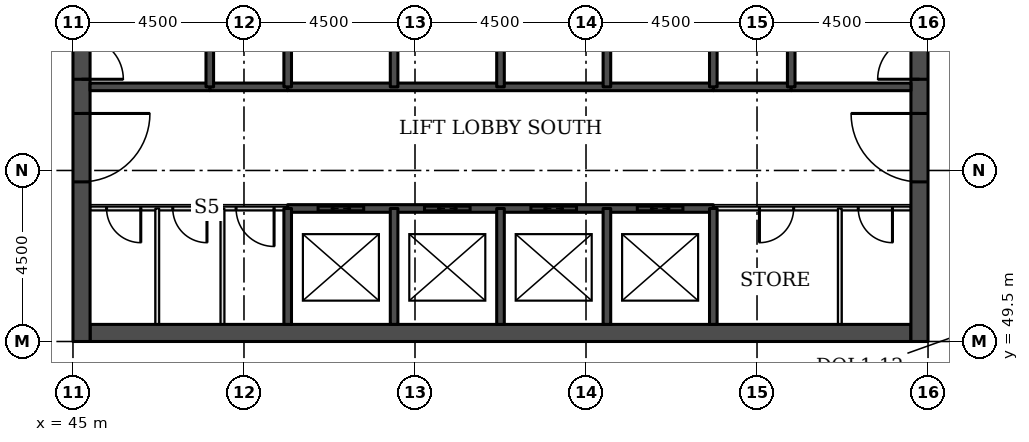
"""IFC4 building model, lengths in metres.
Left out: names, types, materials, properties, quantities, classifications, styles, units other than length and angle.
Written with IfcOpenShell. Run it as: python <this file> out.ifc"""

import sys

from ifc_helpers import new_model, si_unit, direction, frame, frame_2d, origin, place, context, subcontext, project, spatial, rectangle, extrude, element, fill, save


model = new_model("IFC4")
c1 = context("Model", 3, precision=1e-05, world=origin(), true_north=direction((0.0, 1.0)))
c2 = subcontext(c1, "Body", "Model", "MODEL_VIEW")
j1 = project(units=[si_unit("LENGTHUNIT", "METRE"), si_unit("PLANEANGLEUNIT", "RADIAN")], contexts=[c1])
p1 = place(None, origin())
s1 = spatial("IfcSite", under=j1, at=p1, CompositionType="ELEMENT")
p2 = place(p1, origin())
s2 = spatial("IfcBuilding", under=s1, at=p2, CompositionType="ELEMENT")
p3 = place(p2, frame((0.0, 0.0, 78.9)))
s3 = spatial("IfcBuildingStorey", under=s2, at=p3, CompositionType="ELEMENT", Elevation=78.9)
p4 = place(p3, frame((45.45, 49.725, 0.0), z_axis=(0.0, 0.0, 1.0), x_axis=(1.0, 0.0, 0.0)))
e1 = element("IfcWall", 1, at=p4, inside=s3, PredefinedType="SHEAR", context=c2, shape_type="SweptSolid", body=[
    extrude(rectangle(XDim=21.6, YDim=0.45, at=frame_2d((10.8, 0.0))), origin(), (0.0, 0.0, 1.0), 3.7),
])
p5 = place(p3, frame((45.225, 49.5, 0.0), z_axis=(0.0, 0.0, 1.0), x_axis=(0.0, 1.0, 0.0)))
e2 = element("IfcWall", 2, at=p5, inside=s3, PredefinedType="SHEAR", context=c2, shape_type="SweptSolid", body=[
    extrude(rectangle(XDim=22.5, YDim=0.45, at=frame_2d((11.25, 0.0))), origin(), (0.0, 0.0, 1.0), 3.7),
])
p6 = place(p5, frame((4.2, 0.0, 0.0)))
e3 = element("IfcOpeningElement", 3, at=p6, cuts=e2, PredefinedType="OPENING", context=c2, shape_type="SweptSolid", body=[
    extrude(rectangle(XDim=1.8, YDim=2.1, at=frame_2d((0.9, 1.05))), frame((0.0, 0.235, 0.0), z_axis=(0.0, -1.0, 0.0), x_axis=(1.0, 0.0, 0.0)), (0.0, 0.0, 1.0), 0.47),
])
p7 = place(p5, frame((6.9, 0.0, 0.0)))
e4 = element("IfcOpeningElement", 4, at=p7, cuts=e2, PredefinedType="OPENING", context=c2, shape_type="SweptSolid", body=[
    extrude(rectangle(XDim=1.1, YDim=2.1, at=frame_2d((0.55, 1.05))), frame((0.0, 0.235, 0.0), z_axis=(0.0, -1.0, 0.0), x_axis=(1.0, 0.0, 0.0)), (0.0, 0.0, 1.0), 0.47),
])
p8 = place(p5, frame((13.6, 0.0, 0.0)))
e5 = element("IfcOpeningElement", 5, at=p8, cuts=e2, PredefinedType="OPENING", context=c2, shape_type="SweptSolid", body=[
    extrude(rectangle(XDim=1.1, YDim=2.1, at=frame_2d((0.55, 1.05))), frame((0.0, 0.235, 0.0), z_axis=(0.0, -1.0, 0.0), x_axis=(1.0, 0.0, 0.0)), (0.0, 0.0, 1.0), 0.47),
])
p9 = place(p5, frame((16.5, 0.0, 0.0)))
e6 = element("IfcOpeningElement", 6, at=p9, cuts=e2, PredefinedType="OPENING", context=c2, shape_type="SweptSolid", body=[
    extrude(rectangle(XDim=1.8, YDim=2.1, at=frame_2d((0.9, 1.05))), frame((0.0, 0.235, 0.0), z_axis=(0.0, -1.0, 0.0), x_axis=(1.0, 0.0, 0.0)), (0.0, 0.0, 1.0), 0.47),
])
p10 = place(p3, frame((67.275, 49.5, 0.0), z_axis=(0.0, 0.0, 1.0), x_axis=(0.0, 1.0, 0.0)))
e7 = element("IfcWall", 7, at=p10, inside=s3, PredefinedType="SHEAR", context=c2, shape_type="SweptSolid", body=[
    extrude(rectangle(XDim=22.5, YDim=0.45, at=frame_2d((11.25, 0.0))), origin(), (0.0, 0.0, 1.0), 3.7),
])
p11 = place(p10, frame((4.2, 0.0, 0.0)))
e8 = element("IfcOpeningElement", 8, at=p11, cuts=e7, PredefinedType="OPENING", context=c2, shape_type="SweptSolid", body=[
    extrude(rectangle(XDim=1.8, YDim=2.1, at=frame_2d((0.9, 1.05))), frame((0.0, 0.235, 0.0), z_axis=(0.0, -1.0, 0.0), x_axis=(1.0, 0.0, 0.0)), (0.0, 0.0, 1.0), 0.47),
])
p12 = place(p10, frame((6.9, 0.0, 0.0)))
e9 = element("IfcOpeningElement", 9, at=p12, cuts=e7, PredefinedType="OPENING", context=c2, shape_type="SweptSolid", body=[
    extrude(rectangle(XDim=1.1, YDim=2.1, at=frame_2d((0.55, 1.05))), frame((0.0, 0.235, 0.0), z_axis=(0.0, -1.0, 0.0), x_axis=(1.0, 0.0, 0.0)), (0.0, 0.0, 1.0), 0.47),
])
p13 = place(p10, frame((13.6, 0.0, 0.0)))
e10 = element("IfcOpeningElement", 10, at=p13, cuts=e7, PredefinedType="OPENING", context=c2, shape_type="SweptSolid", body=[
    extrude(rectangle(XDim=1.1, YDim=2.1, at=frame_2d((0.55, 1.05))), frame((0.0, 0.235, 0.0), z_axis=(0.0, -1.0, 0.0), x_axis=(1.0, 0.0, 0.0)), (0.0, 0.0, 1.0), 0.47),
])
p14 = place(p10, frame((16.5, 0.0, 0.0)))
e11 = element("IfcOpeningElement", 11, at=p14, cuts=e7, PredefinedType="OPENING", context=c2, shape_type="SweptSolid", body=[
    extrude(rectangle(XDim=1.8, YDim=2.1, at=frame_2d((0.9, 1.05))), frame((0.0, 0.235, 0.0), z_axis=(0.0, -1.0, 0.0), x_axis=(1.0, 0.0, 0.0)), (0.0, 0.0, 1.0), 0.47),
])
p15 = place(p3, frame((45.45, 53.0, 0.0), z_axis=(0.0, 0.0, 1.0), x_axis=(1.0, 0.0, 0.0)))
e12 = element("IfcWall", 12, at=p15, inside=s3, PredefinedType="PARTITIONING", context=c2, shape_type="SweptSolid", body=[
    extrude(rectangle(XDim=5.2, YDim=0.1, at=frame_2d((2.6, 0.0))), origin(), (0.0, 0.0, 1.0), 3.55),
])
p16 = place(p15, frame((0.434, 0.0, 0.0)))
e13 = element("IfcOpeningElement", 13, at=p16, cuts=e12, PredefinedType="OPENING", context=c2, shape_type="SweptSolid", body=[
    extrude(rectangle(XDim=0.9, YDim=2.1, at=frame_2d((0.45, 1.05))), frame((0.0, 0.06, 0.0), z_axis=(0.0, -1.0, 0.0), x_axis=(1.0, 0.0, 0.0)), (0.0, 0.0, 1.0), 0.12),
])
p17 = place(p15, frame((2.176, 0.0, 0.0)))
e14 = element("IfcOpeningElement", 14, at=p17, cuts=e12, PredefinedType="OPENING", context=c2, shape_type="SweptSolid", body=[
    extrude(rectangle(XDim=0.9, YDim=2.1, at=frame_2d((0.45, 1.05))), frame((0.0, 0.06, 0.0), z_axis=(0.0, -1.0, 0.0), x_axis=(1.0, 0.0, 0.0)), (0.0, 0.0, 1.0), 0.12),
])
p18 = place(p15, frame((3.842, 0.0, 0.0)))
e15 = element("IfcOpeningElement", 15, at=p18, cuts=e12, PredefinedType="OPENING", context=c2, shape_type="SweptSolid", body=[
    extrude(rectangle(XDim=1.0, YDim=2.1, at=frame_2d((0.5, 1.05))), frame((0.0, 0.06, 0.0), z_axis=(0.0, -1.0, 0.0), x_axis=(1.0, 0.0, 0.0)), (0.0, 0.0, 1.0), 0.12),
])
p19 = place(p3, frame((61.85, 53.0, 0.0), z_axis=(0.0, 0.0, 1.0), x_axis=(1.0, 0.0, 0.0)))
e16 = element("IfcWall", 16, at=p19, inside=s3, PredefinedType="PARTITIONING", context=c2, shape_type="SweptSolid", body=[
    extrude(rectangle(XDim=5.2, YDim=0.1, at=frame_2d((2.6, 0.0))), origin(), (0.0, 0.0, 1.0), 3.55),
])
p20 = place(p19, frame((3.814, 0.0, 0.0)))
e17 = element("IfcOpeningElement", 17, at=p20, cuts=e16, PredefinedType="OPENING", context=c2, shape_type="SweptSolid", body=[
    extrude(rectangle(XDim=0.9, YDim=2.1, at=frame_2d((0.45, 1.05))), frame((0.0, 0.06, 0.0), z_axis=(0.0, -1.0, 0.0), x_axis=(1.0, 0.0, 0.0)), (0.0, 0.0, 1.0), 0.12),
])
p21 = place(p19, frame((1.214, 0.0, 0.0)))
e18 = element("IfcOpeningElement", 18, at=p21, cuts=e16, PredefinedType="OPENING", context=c2, shape_type="SweptSolid", body=[
    extrude(rectangle(XDim=0.9, YDim=2.1, at=frame_2d((0.45, 1.05))), frame((0.0, 0.06, 0.0), z_axis=(0.0, -1.0, 0.0), x_axis=(1.0, 0.0, 0.0)), (0.0, 0.0, 1.0), 0.12),
])
p22 = place(p3, frame((50.65, 53.0, 0.0), z_axis=(0.0, 0.0, 1.0), x_axis=(1.0, 0.0, 0.0)))
e19 = element("IfcWall", 19, at=p22, inside=s3, PredefinedType="SOLIDWALL", context=c2, shape_type="SweptSolid", body=[
    extrude(rectangle(XDim=11.2, YDim=0.2, at=frame_2d((5.6, 0.0))), origin(), (0.0, 0.0, 1.0), 3.55),
])
p23 = place(p22, frame((0.8, 0.0, 0.0)))
e20 = element("IfcOpeningElement", 20, at=p23, cuts=e19, PredefinedType="OPENING", context=c2, shape_type="SweptSolid", body=[
    extrude(rectangle(XDim=1.2, YDim=2.1, at=frame_2d((0.6, 1.05))), frame((0.0, 0.11, 0.0), z_axis=(0.0, -1.0, 0.0), x_axis=(1.0, 0.0, 0.0)), (0.0, 0.0, 1.0), 0.22),
])
p24 = place(p22, frame((3.6, 0.0, 0.0)))
e21 = element("IfcOpeningElement", 21, at=p24, cuts=e19, PredefinedType="OPENING", context=c2, shape_type="SweptSolid", body=[
    extrude(rectangle(XDim=1.2, YDim=2.1, at=frame_2d((0.6, 1.05))), frame((0.0, 0.11, 0.0), z_axis=(0.0, -1.0, 0.0), x_axis=(1.0, 0.0, 0.0)), (0.0, 0.0, 1.0), 0.22),
])
p25 = place(p22, frame((6.4, 0.0, 0.0)))
e22 = element("IfcOpeningElement", 22, at=p25, cuts=e19, PredefinedType="OPENING", context=c2, shape_type="SweptSolid", body=[
    extrude(rectangle(XDim=1.2, YDim=2.1, at=frame_2d((0.6, 1.05))), frame((0.0, 0.11, 0.0), z_axis=(0.0, -1.0, 0.0), x_axis=(1.0, 0.0, 0.0)), (0.0, 0.0, 1.0), 0.22),
])
p26 = place(p22, frame((9.2, 0.0, 0.0)))
e23 = element("IfcOpeningElement", 23, at=p26, cuts=e19, PredefinedType="OPENING", context=c2, shape_type="SweptSolid", body=[
    extrude(rectangle(XDim=1.2, YDim=2.1, at=frame_2d((0.6, 1.05))), frame((0.0, 0.11, 0.0), z_axis=(0.0, -1.0, 0.0), x_axis=(1.0, 0.0, 0.0)), (0.0, 0.0, 1.0), 0.22),
])
for number, where, z_axis, x_axis in (
    (24, (48.6, 56.2, 0.0), (0.0, 0.0, 1.0), (1.0, 0.0, 0.0)),
    (25, (61.85, 56.2, 0.0), (0.0, 0.0, 1.0), (1.0, 0.0, 0.0)),
):
    element("IfcWall", number, at=place(p3, frame(where, z_axis=z_axis, x_axis=x_axis)), inside=s3, PredefinedType="SOLIDWALL", context=c2, shape_type="SweptSolid", body=[
        extrude(rectangle(XDim=2.05, YDim=0.2, at=frame_2d((1.025, 0.0))), origin(), (0.0, 0.0, 1.0), 3.55),
    ])
p27 = place(p3, frame((45.45, 56.2, 0.0), z_axis=(0.0, 0.0, 1.0), x_axis=(1.0, 0.0, 0.0)))
e26 = element("IfcWall", 26, at=p27, inside=s3, PredefinedType="SOLIDWALL", context=c2, shape_type="SweptSolid", body=[
    extrude(rectangle(XDim=3.15, YDim=0.2, at=frame_2d((1.575, 0.0))), origin(), (0.0, 0.0, 1.0), 3.55),
])
p28 = place(p3, frame((50.65, 56.2, 0.0), z_axis=(0.0, 0.0, 1.0), x_axis=(1.0, 0.0, 0.0)))
e27 = element("IfcWall", 27, at=p28, inside=s3, PredefinedType="SOLIDWALL", context=c2, shape_type="SweptSolid", body=[
    extrude(rectangle(XDim=11.2, YDim=0.2, at=frame_2d((5.6, 0.0))), origin(), (0.0, 0.0, 1.0), 3.55),
])
p29 = place(p3, frame((63.9, 56.2, 0.0), z_axis=(0.0, 0.0, 1.0), x_axis=(1.0, 0.0, 0.0)))
e28 = element("IfcWall", 28, at=p29, inside=s3, PredefinedType="SOLIDWALL", context=c2, shape_type="SweptSolid", body=[
    extrude(rectangle(XDim=3.15, YDim=0.2, at=frame_2d((1.575, 0.0))), origin(), (0.0, 0.0, 1.0), 3.55),
])
p30 = place(p3, frame((47.218, 49.95, 0.0), z_axis=(0.0, 0.0, 1.0), x_axis=(0.0, 1.0, 0.0)))
e29 = element("IfcWall", 29, at=p30, inside=s3, PredefinedType="PARTITIONING", context=c2, shape_type="SweptSolid", body=[
    extrude(rectangle(XDim=3.05, YDim=0.1, at=frame_2d((1.525, 0.0))), origin(), (0.0, 0.0, 1.0), 3.55),
])
p31 = place(p3, frame((48.6, 56.2, 0.0), z_axis=(0.0, 0.0, 1.0), x_axis=(0.0, 1.0, 0.0)))
e30 = element("IfcWall", 30, at=p31, inside=s3, PredefinedType="SOLIDWALL", context=c2, shape_type="SweptSolid", body=[
    extrude(rectangle(XDim=5.8, YDim=0.2, at=frame_2d((2.9, 0.0))), origin(), (0.0, 0.0, 1.0), 3.55),
])
p32 = place(p3, frame((48.934, 49.95, 0.0), z_axis=(0.0, 0.0, 1.0), x_axis=(0.0, 1.0, 0.0)))
e31 = element("IfcWall", 31, at=p32, inside=s3, PredefinedType="PARTITIONING", context=c2, shape_type="SweptSolid", body=[
    extrude(rectangle(XDim=3.05, YDim=0.1, at=frame_2d((1.525, 0.0))), origin(), (0.0, 0.0, 1.0), 3.55),
])
p33 = place(p3, frame((50.65, 49.95, 0.0), z_axis=(0.0, 0.0, 1.0), x_axis=(0.0, 1.0, 0.0)))
e32 = element("IfcWall", 32, at=p33, inside=s3, PredefinedType="SOLIDWALL", context=c2, shape_type="SweptSolid", body=[
    extrude(rectangle(XDim=3.05, YDim=0.2, at=frame_2d((1.525, 0.0))), origin(), (0.0, 0.0, 1.0), 3.55),
])
p34 = place(p3, frame((50.65, 56.2, 0.0), z_axis=(0.0, 0.0, 1.0), x_axis=(0.0, 1.0, 0.0)))
e33 = element("IfcWall", 33, at=p34, inside=s3, PredefinedType="SOLIDWALL", context=c2, shape_type="SweptSolid", body=[
    extrude(rectangle(XDim=2.8, YDim=0.2, at=frame_2d((1.4, 0.0))), origin(), (0.0, 0.0, 1.0), 3.55),
])
p35 = place(p3, frame((53.45, 49.95, 0.0), z_axis=(0.0, 0.0, 1.0), x_axis=(0.0, 1.0, 0.0)))
e34 = element("IfcWall", 34, at=p35, inside=s3, PredefinedType="SOLIDWALL", context=c2, shape_type="SweptSolid", body=[
    extrude(rectangle(XDim=3.05, YDim=0.2, at=frame_2d((1.525, 0.0))), origin(), (0.0, 0.0, 1.0), 3.55),
])
p36 = place(p3, frame((53.45, 56.2, 0.0), z_axis=(0.0, 0.0, 1.0), x_axis=(0.0, 1.0, 0.0)))
e35 = element("IfcWall", 35, at=p36, inside=s3, PredefinedType="SOLIDWALL", context=c2, shape_type="SweptSolid", body=[
    extrude(rectangle(XDim=2.8, YDim=0.2, at=frame_2d((1.4, 0.0))), origin(), (0.0, 0.0, 1.0), 3.55),
])
p37 = place(p3, frame((56.25, 49.95, 0.0), z_axis=(0.0, 0.0, 1.0), x_axis=(0.0, 1.0, 0.0)))
e36 = element("IfcWall", 36, at=p37, inside=s3, PredefinedType="SOLIDWALL", context=c2, shape_type="SweptSolid", body=[
    extrude(rectangle(XDim=3.05, YDim=0.2, at=frame_2d((1.525, 0.0))), origin(), (0.0, 0.0, 1.0), 3.55),
])
p38 = place(p3, frame((56.25, 56.2, 0.0), z_axis=(0.0, 0.0, 1.0), x_axis=(0.0, 1.0, 0.0)))
e37 = element("IfcWall", 37, at=p38, inside=s3, PredefinedType="SOLIDWALL", context=c2, shape_type="SweptSolid", body=[
    extrude(rectangle(XDim=2.8, YDim=0.2, at=frame_2d((1.4, 0.0))), origin(), (0.0, 0.0, 1.0), 3.55),
])
p39 = place(p3, frame((59.05, 49.95, 0.0), z_axis=(0.0, 0.0, 1.0), x_axis=(0.0, 1.0, 0.0)))
e38 = element("IfcWall", 38, at=p39, inside=s3, PredefinedType="SOLIDWALL", context=c2, shape_type="SweptSolid", body=[
    extrude(rectangle(XDim=3.05, YDim=0.2, at=frame_2d((1.525, 0.0))), origin(), (0.0, 0.0, 1.0), 3.55),
])
p40 = place(p3, frame((59.05, 56.2, 0.0), z_axis=(0.0, 0.0, 1.0), x_axis=(0.0, 1.0, 0.0)))
e39 = element("IfcWall", 39, at=p40, inside=s3, PredefinedType="SOLIDWALL", context=c2, shape_type="SweptSolid", body=[
    extrude(rectangle(XDim=2.8, YDim=0.2, at=frame_2d((1.4, 0.0))), origin(), (0.0, 0.0, 1.0), 3.55),
])
p41 = place(p3, frame((61.85, 49.95, 0.0), z_axis=(0.0, 0.0, 1.0), x_axis=(0.0, 1.0, 0.0)))
e40 = element("IfcWall", 40, at=p41, inside=s3, PredefinedType="SOLIDWALL", context=c2, shape_type="SweptSolid", body=[
    extrude(rectangle(XDim=3.05, YDim=0.2, at=frame_2d((1.525, 0.0))), origin(), (0.0, 0.0, 1.0), 3.55),
])
p42 = place(p3, frame((61.85, 56.2, 0.0), z_axis=(0.0, 0.0, 1.0), x_axis=(0.0, 1.0, 0.0)))
e41 = element("IfcWall", 41, at=p42, inside=s3, PredefinedType="SOLIDWALL", context=c2, shape_type="SweptSolid", body=[
    extrude(rectangle(XDim=2.8, YDim=0.2, at=frame_2d((1.4, 0.0))), origin(), (0.0, 0.0, 1.0), 3.55),
])
p43 = place(p3, frame((63.9, 56.2, 0.0), z_axis=(0.0, 0.0, 1.0), x_axis=(0.0, 1.0, 0.0)))
e42 = element("IfcWall", 42, at=p43, inside=s3, PredefinedType="SOLIDWALL", context=c2, shape_type="SweptSolid", body=[
    extrude(rectangle(XDim=5.8, YDim=0.2, at=frame_2d((2.9, 0.0))), origin(), (0.0, 0.0, 1.0), 3.55),
])
p44 = place(p3, frame((65.178, 49.95, 0.0), z_axis=(0.0, 0.0, 1.0), x_axis=(0.0, 1.0, 0.0)))
e43 = element("IfcWall", 43, at=p44, inside=s3, PredefinedType="PARTITIONING", context=c2, shape_type="SweptSolid", body=[
    extrude(rectangle(XDim=3.05, YDim=0.1, at=frame_2d((1.525, 0.0))), origin(), (0.0, 0.0, 1.0), 3.55),
])
p45 = place(p23, origin())
e44 = element("IfcDoor", 44, at=p45, inside=s3, OperationType="DOUBLE_DOOR_SLIDING", PredefinedType="DOOR", context=c2, shape_type="SweptSolid", body=[
    extrude(rectangle(XDim=1.2, YDim=2.1, at=frame_2d((0.6, 1.05))), frame((0.0, 0.025, 0.0), z_axis=(0.0, -1.0, 0.0), x_axis=(1.0, 0.0, 0.0)), (0.0, 0.0, 1.0), 0.05),
])
fill(e20, e44)
p46 = place(p24, origin())
e45 = element("IfcDoor", 45, at=p46, inside=s3, OperationType="DOUBLE_DOOR_SLIDING", PredefinedType="DOOR", context=c2, shape_type="SweptSolid", body=[
    extrude(rectangle(XDim=1.2, YDim=2.1, at=frame_2d((0.6, 1.05))), frame((0.0, 0.025, 0.0), z_axis=(0.0, -1.0, 0.0), x_axis=(1.0, 0.0, 0.0)), (0.0, 0.0, 1.0), 0.05),
])
fill(e21, e45)
p47 = place(p25, origin())
e46 = element("IfcDoor", 46, at=p47, inside=s3, OperationType="DOUBLE_DOOR_SLIDING", PredefinedType="DOOR", context=c2, shape_type="SweptSolid", body=[
    extrude(rectangle(XDim=1.2, YDim=2.1, at=frame_2d((0.6, 1.05))), frame((0.0, 0.025, 0.0), z_axis=(0.0, -1.0, 0.0), x_axis=(1.0, 0.0, 0.0)), (0.0, 0.0, 1.0), 0.05),
])
fill(e22, e46)
p48 = place(p26, origin())
e47 = element("IfcDoor", 47, at=p48, inside=s3, OperationType="DOUBLE_DOOR_SLIDING", PredefinedType="DOOR", context=c2, shape_type="SweptSolid", body=[
    extrude(rectangle(XDim=1.2, YDim=2.1, at=frame_2d((0.6, 1.05))), frame((0.0, 0.025, 0.0), z_axis=(0.0, -1.0, 0.0), x_axis=(1.0, 0.0, 0.0)), (0.0, 0.0, 1.0), 0.05),
])
fill(e23, e47)
p49 = place(p6, frame((1.8, 0.0, 0.0), z_axis=(0.0, 0.0, 1.0), x_axis=(-1.0, 0.0, 0.0)))
e48 = element("IfcDoor", 48, at=p49, inside=s3, OperationType="SINGLE_SWING_LEFT", PredefinedType="DOOR", context=c2, shape_type="SweptSolid", body=[
    extrude(rectangle(XDim=1.8, YDim=2.1, at=frame_2d((0.9, 1.05))), frame((0.0, 0.025, 0.0), z_axis=(0.0, -1.0, 0.0), x_axis=(1.0, 0.0, 0.0)), (0.0, 0.0, 1.0), 0.05),
])
fill(e3, e48)
p50 = place(p7, frame((1.1, 0.0, 0.0), z_axis=(0.0, 0.0, 1.0), x_axis=(-1.0, 0.0, 0.0)))
e49 = element("IfcDoor", 49, at=p50, inside=s3, OperationType="SINGLE_SWING_RIGHT", PredefinedType="DOOR", context=c2, shape_type="SweptSolid", body=[
    extrude(rectangle(XDim=1.1, YDim=2.1, at=frame_2d((0.55, 1.05))), frame((0.0, 0.025, 0.0), z_axis=(0.0, -1.0, 0.0), x_axis=(1.0, 0.0, 0.0)), (0.0, 0.0, 1.0), 0.05),
])
fill(e4, e49)
p51 = place(p11, origin())
e50 = element("IfcDoor", 50, at=p51, inside=s3, OperationType="SINGLE_SWING_RIGHT", PredefinedType="DOOR", context=c2, shape_type="SweptSolid", body=[
    extrude(rectangle(XDim=1.8, YDim=2.1, at=frame_2d((0.9, 1.05))), frame((0.0, 0.025, 0.0), z_axis=(0.0, -1.0, 0.0), x_axis=(1.0, 0.0, 0.0)), (0.0, 0.0, 1.0), 0.05),
])
fill(e8, e50)
p52 = place(p12, origin())
e51 = element("IfcDoor", 51, at=p52, inside=s3, OperationType="SINGLE_SWING_LEFT", PredefinedType="DOOR", context=c2, shape_type="SweptSolid", body=[
    extrude(rectangle(XDim=1.1, YDim=2.1, at=frame_2d((0.55, 1.05))), frame((0.0, 0.025, 0.0), z_axis=(0.0, -1.0, 0.0), x_axis=(1.0, 0.0, 0.0)), (0.0, 0.0, 1.0), 0.05),
])
fill(e9, e51)
p53 = place(p20, frame((0.9, 0.0, 0.0), z_axis=(0.0, 0.0, 1.0), x_axis=(-1.0, 0.0, 0.0)))
e52 = element("IfcDoor", 52, at=p53, inside=s3, OperationType="SINGLE_SWING_LEFT", PredefinedType="DOOR", context=c2, shape_type="SweptSolid", body=[
    extrude(rectangle(XDim=0.9, YDim=2.1, at=frame_2d((0.45, 1.05))), frame((0.0, 0.025, 0.0), z_axis=(0.0, -1.0, 0.0), x_axis=(1.0, 0.0, 0.0)), (0.0, 0.0, 1.0), 0.05),
])
fill(e17, e52)
p54 = place(p21, frame((0.9, 0.0, 0.0), z_axis=(0.0, 0.0, 1.0), x_axis=(-1.0, 0.0, 0.0)))
e53 = element("IfcDoor", 53, at=p54, inside=s3, OperationType="SINGLE_SWING_RIGHT", PredefinedType="DOOR", context=c2, shape_type="SweptSolid", body=[
    extrude(rectangle(XDim=0.9, YDim=2.1, at=frame_2d((0.45, 1.05))), frame((0.0, 0.025, 0.0), z_axis=(0.0, -1.0, 0.0), x_axis=(1.0, 0.0, 0.0)), (0.0, 0.0, 1.0), 0.05),
])
fill(e18, e53)
p55 = place(p16, frame((0.9, 0.0, 0.0), z_axis=(0.0, 0.0, 1.0), x_axis=(-1.0, 0.0, 0.0)))
e54 = element("IfcDoor", 54, at=p55, inside=s3, OperationType="SINGLE_SWING_LEFT", PredefinedType="DOOR", context=c2, shape_type="SweptSolid", body=[
    extrude(rectangle(XDim=0.9, YDim=2.1, at=frame_2d((0.45, 1.05))), frame((0.0, 0.025, 0.0), z_axis=(0.0, -1.0, 0.0), x_axis=(1.0, 0.0, 0.0)), (0.0, 0.0, 1.0), 0.05),
])
fill(e13, e54)
p56 = place(p17, frame((0.9, 0.0, 0.0), z_axis=(0.0, 0.0, 1.0), x_axis=(-1.0, 0.0, 0.0)))
e55 = element("IfcDoor", 55, at=p56, inside=s3, OperationType="SINGLE_SWING_LEFT", PredefinedType="DOOR", context=c2, shape_type="SweptSolid", body=[
    extrude(rectangle(XDim=0.9, YDim=2.1, at=frame_2d((0.45, 1.05))), frame((0.0, 0.025, 0.0), z_axis=(0.0, -1.0, 0.0), x_axis=(1.0, 0.0, 0.0)), (0.0, 0.0, 1.0), 0.05),
])
fill(e14, e55)
p57 = place(p18, frame((1.0, 0.0, 0.0), z_axis=(0.0, 0.0, 1.0), x_axis=(-1.0, 0.0, 0.0)))
e56 = element("IfcDoor", 56, at=p57, inside=s3, OperationType="SINGLE_SWING_LEFT", PredefinedType="DOOR", context=c2, shape_type="SweptSolid", body=[
    extrude(rectangle(XDim=1.0, YDim=2.1, at=frame_2d((0.5, 1.05))), frame((0.0, 0.025, 0.0), z_axis=(0.0, -1.0, 0.0), x_axis=(1.0, 0.0, 0.0)), (0.0, 0.0, 1.0), 0.05),
])
fill(e15, e56)
save(model, sys.argv[1])
